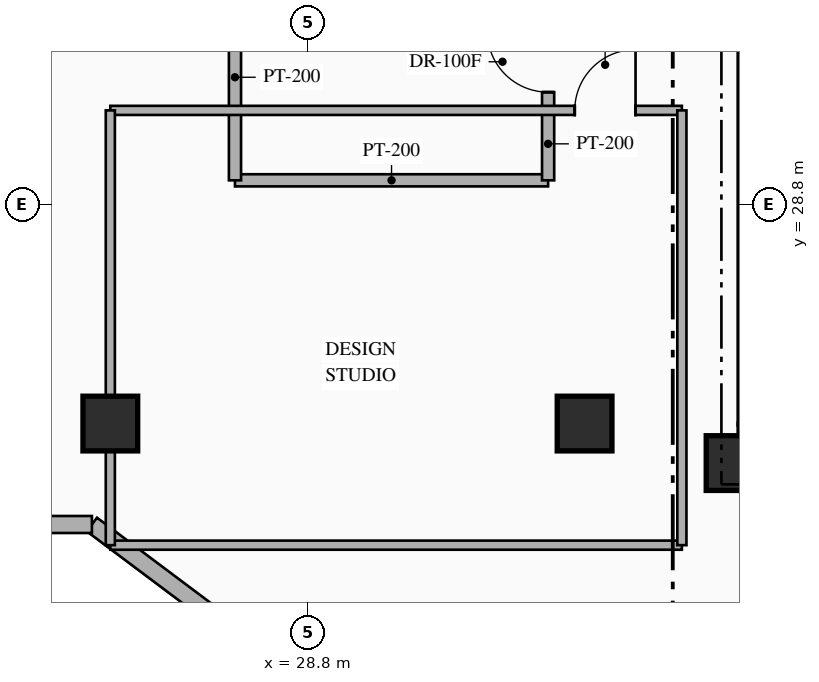
"""IFC4 building model, lengths in metres.
Left out: names, types, materials, properties, quantities, classifications, styles, units other than length and angle.
Written with IfcOpenShell. Run it as: python <this file> out.ifc"""

import sys

from ifc_helpers import new_model, si_unit, direction, frame, frame_2d, origin, origin_2d, place, context, subcontext, project, spatial, rectangle, hollow_rectangle, extrude, element, fill, save


model = new_model("IFC4")
c1 = context("Model", 3, precision=1e-05, world=origin(), true_north=direction((0.0, 1.0)))
c2 = subcontext(c1, "Body", "Model", "MODEL_VIEW")
j1 = project(units=[si_unit("LENGTHUNIT", "METRE"), si_unit("PLANEANGLEUNIT", "RADIAN")], contexts=[c1])
p1 = place(None, origin())
s1 = spatial("IfcSite", under=j1, at=p1, CompositionType="ELEMENT")
p2 = place(p1, origin())
s2 = spatial("IfcBuilding", under=s1, at=p2, CompositionType="ELEMENT")
p3 = place(p2, frame((0.0, 0.0, 104.85)))
s3 = spatial("IfcBuildingStorey", under=s2, at=p3, CompositionType="ELEMENT", Elevation=104.85)
p4 = place(p3, frame((35.89, 24.89, 0.0), z_axis=(0.0, 0.0, 1.0), x_axis=(1.0, 0.0, 0.0)))
e1 = element("IfcWall", 1, at=p4, inside=s3, PredefinedType="SHEAR", context=c2, shape_type="SweptSolid", body=[
    extrude(rectangle(XDim=7.76, YDim=0.6, at=frame_2d((3.88, 0.0))), origin(), (0.0, 0.0, 1.0), 3.6),
])
p5 = place(p3, frame((36.19, 25.19, 0.0), z_axis=(0.0, 0.0, 1.0), x_axis=(0.0, 1.0, 0.0)))
e2 = element("IfcWall", 2, at=p5, inside=s3, PredefinedType="SHEAR", context=c2, shape_type="SweptSolid", body=[
    extrude(rectangle(XDim=9.48, YDim=0.6, at=frame_2d((4.74, 0.0))), origin(), (0.0, 0.0, 1.0), 3.6),
])
p6 = place(p3, frame((35.8, 24.55, 0.0), z_axis=(0.0, 0.0, 1.0), x_axis=(1.0, 0.0, 0.0)))
e3 = element("IfcColumn", 3, at=p6, inside=s3, PredefinedType="COLUMN", context=c2, shape_type="SweptSolid", body=[
    extrude(rectangle(XDim=0.9, YDim=0.9, at=origin_2d()), origin(), (0.0, 0.0, 1.0), 3.6),
])
for number, where, z_axis, x_axis in (
    (4, (25.55, 25.2, 0.0), (0.0, 0.0, 1.0), (1.0, 0.0, 0.0)),
    (5, (33.35, 25.2, 0.0), (0.0, 0.0, 1.0), (1.0, 0.0, 0.0)),
):
    element("IfcColumn", number, at=place(p3, frame(where, z_axis=z_axis, x_axis=x_axis)), inside=s3, PredefinedType="COLUMN", context=c2, shape_type="SweptSolid", body=[
        extrude(hollow_rectangle(XDim=0.9, YDim=0.9, WallThickness=0.036, at=origin_2d()), origin(), (0.0, 0.0, 1.0), 3.6),
    ])
p7 = place(p3, frame((53.318, 2.487, 0.0), z_axis=(0.0, 0.0, 1.0), x_axis=(-0.800004174678, 0.599994433723, 0.0)))
e6 = element("IfcWall", 6, at=p7, inside=s3, PredefinedType="STANDARD", context=c2, shape_type="SweptSolid", body=[
    extrude(rectangle(XDim=35.089, YDim=0.28, at=frame_2d((17.544, 0.0))), origin(), (0.0, 0.0, 1.0), 3.35),
])
p8 = place(p3, frame((25.247, 23.54, 0.0), z_axis=(0.0, 0.0, 1.0), x_axis=(-1.0, 0.0, 0.0)))
e7 = element("IfcWall", 7, at=p8, inside=s3, PredefinedType="STANDARD", context=c2, shape_type="SweptSolid", body=[
    extrude(rectangle(XDim=6.747, YDim=0.28, at=frame_2d((3.374, 0.0))), origin(), (0.0, 0.0, 1.0), 3.35),
])
p9 = place(p3, frame((27.6, 29.2, 0.0), z_axis=(0.0, 0.0, 1.0), x_axis=(1.0, 0.0, 0.0)))
e8 = element("IfcWall", 8, at=p9, inside=s3, PredefinedType="STANDARD", context=c2, shape_type="SweptSolid", body=[
    extrude(rectangle(XDim=5.15, YDim=0.2, at=frame_2d((2.575, 0.0))), origin(), (0.0, 0.0, 1.0), 3.35),
])
p10 = place(p3, frame((27.6, 29.2, 0.0), z_axis=(0.0, 0.0, 1.0), x_axis=(0.0, 1.0, 0.0)))
e9 = element("IfcWall", 9, at=p10, inside=s3, PredefinedType="STANDARD", context=c2, shape_type="SweptSolid", body=[
    extrude(rectangle(XDim=3.39, YDim=0.2, at=frame_2d((1.695, 0.0))), origin(), (0.0, 0.0, 1.0), 3.35),
])
p11 = place(p3, frame((32.75, 29.2, 0.0), z_axis=(0.0, 0.0, 1.0), x_axis=(0.0, 1.0, 0.0)))
e10 = element("IfcWall", 10, at=p11, inside=s3, PredefinedType="STANDARD", context=c2, shape_type="SweptSolid", body=[
    extrude(rectangle(XDim=3.39, YDim=0.2, at=frame_2d((1.695, 0.0))), origin(), (0.0, 0.0, 1.0), 3.35),
])
p12 = place(p11, frame((1.45, 0.0, 0.0)))
e11 = element("IfcOpeningElement", 11, at=p12, cuts=e10, PredefinedType="OPENING", context=c2, shape_type="SweptSolid", body=[
    extrude(rectangle(XDim=1.0, YDim=2.2, at=frame_2d((0.5, 1.1))), frame((0.0, 0.11, 0.0), z_axis=(0.0, -1.0, 0.0), x_axis=(1.0, 0.0, 0.0)), (0.0, 0.0, 1.0), 0.22),
])
p13 = place(p3, frame((25.55, 23.2, 0.0), z_axis=(0.0, 0.0, 1.0), x_axis=(1.0, 0.0, 0.0)))
e12 = element("IfcWall", 12, at=p13, inside=s3, PredefinedType="PARTITIONING", context=c2, shape_type="SweptSolid", body=[
    extrude(rectangle(XDim=9.4, YDim=0.15, at=frame_2d((4.7, 0.0))), origin(), (0.0, 0.0, 1.0), 3.35),
])
p14 = place(p3, frame((25.55, 30.35, 0.0), z_axis=(0.0, 0.0, 1.0), x_axis=(1.0, 0.0, 0.0)))
e13 = element("IfcWall", 13, at=p14, inside=s3, PredefinedType="PARTITIONING", context=c2, shape_type="SweptSolid", body=[
    extrude(rectangle(XDim=9.4, YDim=0.15, at=frame_2d((4.7, 0.0))), origin(), (0.0, 0.0, 1.0), 3.35),
])
p15 = place(p14, frame((7.638, 0.0, 0.0)))
e14 = element("IfcOpeningElement", 14, at=p15, cuts=e13, PredefinedType="OPENING", context=c2, shape_type="SweptSolid", body=[
    extrude(rectangle(XDim=1.0, YDim=2.15, at=frame_2d((0.5, 1.075))), frame((0.0, 0.085, 0.0), z_axis=(0.0, -1.0, 0.0), x_axis=(1.0, 0.0, 0.0)), (0.0, 0.0, 1.0), 0.17),
])
p16 = place(p3, frame((25.55, 23.2, 0.0), z_axis=(0.0, 0.0, 1.0), x_axis=(0.0, 1.0, 0.0)))
e15 = element("IfcWall", 15, at=p16, inside=s3, PredefinedType="PARTITIONING", context=c2, shape_type="SweptSolid", body=[
    extrude(rectangle(XDim=7.15, YDim=0.15, at=frame_2d((3.575, 0.0))), origin(), (0.0, 0.0, 1.0), 2.695),
])
p17 = place(p3, frame((34.95, 23.2, 0.0), z_axis=(0.0, 0.0, 1.0), x_axis=(0.0, 1.0, 0.0)))
e16 = element("IfcWall", 16, at=p17, inside=s3, PredefinedType="PARTITIONING", context=c2, shape_type="SweptSolid", body=[
    extrude(rectangle(XDim=7.15, YDim=0.15, at=frame_2d((3.575, 0.0))), origin(), (0.0, 0.0, 1.0), 3.35),
])
p18 = place(p12, origin())
e17 = element("IfcDoor", 17, at=p18, inside=s3, OperationType="SINGLE_SWING_RIGHT", PredefinedType="DOOR", context=c2, shape_type="SweptSolid", body=[
    extrude(rectangle(XDim=1.0, YDim=2.2, at=frame_2d((0.5, 1.1))), frame((0.0, 0.025, 0.0), z_axis=(0.0, -1.0, 0.0), x_axis=(1.0, 0.0, 0.0)), (0.0, 0.0, 1.0), 0.05),
])
fill(e11, e17)
p19 = place(p15, origin())
e18 = element("IfcDoor", 18, at=p19, inside=s3, OperationType="SINGLE_SWING_RIGHT", PredefinedType="DOOR", context=c2, shape_type="SweptSolid", body=[
    extrude(rectangle(XDim=1.0, YDim=2.15, at=frame_2d((0.5, 1.075))), frame((0.0, 0.025, 0.0), z_axis=(0.0, -1.0, 0.0), x_axis=(1.0, 0.0, 0.0)), (0.0, 0.0, 1.0), 0.05),
])
fill(e14, e18)
save(model, sys.argv[1])
